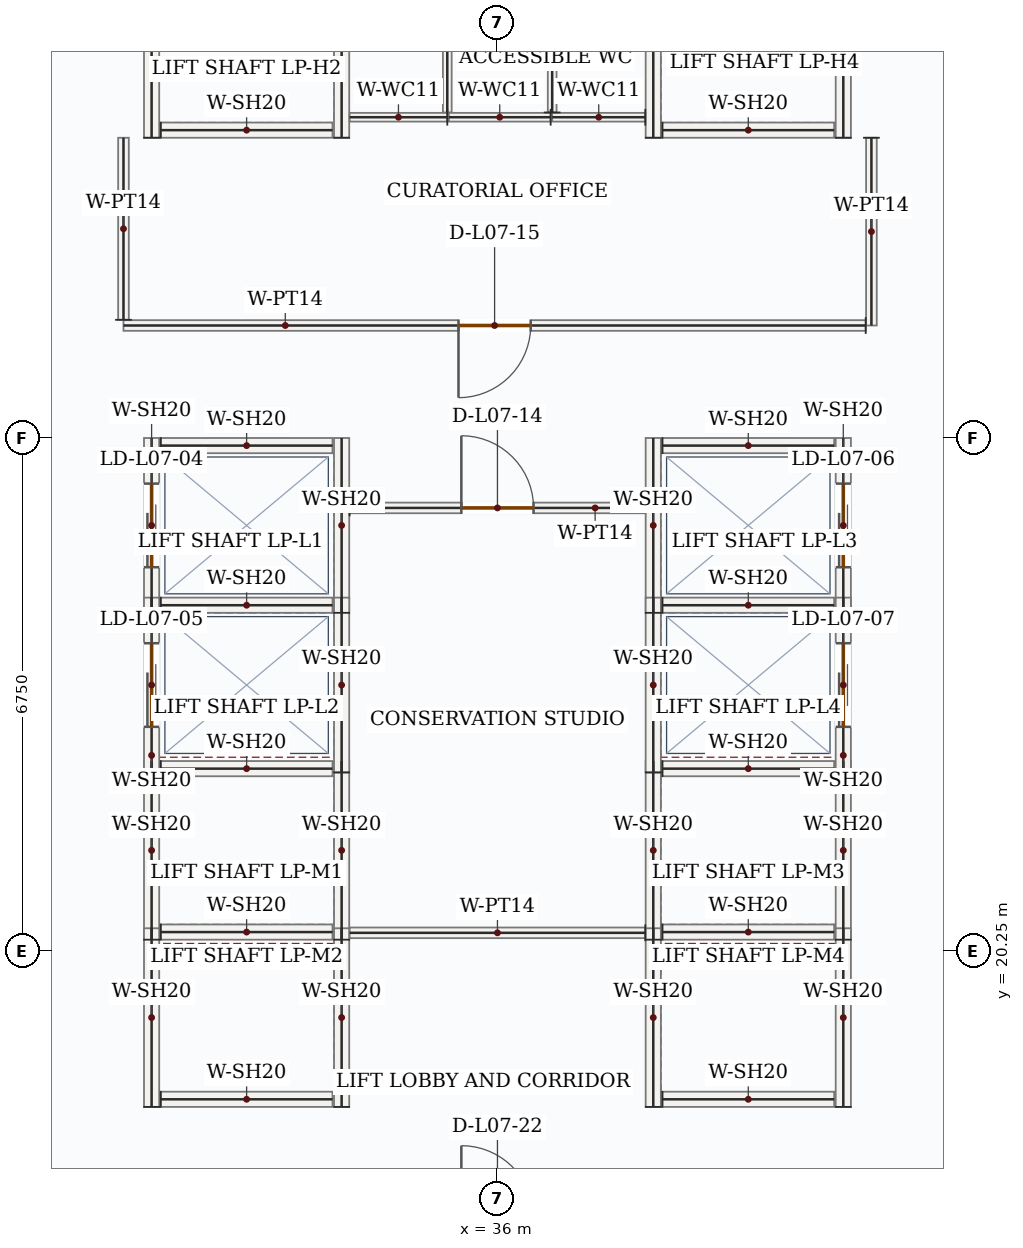
"""IFC4 building model, lengths in metres.
Left out: names, types, materials, properties, quantities, classifications, styles, units other than length and angle.
Written with IfcOpenShell. Run it as: python <this file> out.ifc"""

import sys

from ifc_helpers import new_model, si_unit, direction, frame, frame_2d, origin, place, context, subcontext, project, spatial, rectangle, extrude, source, transform, mapped, element, fill, save


model = new_model("IFC4")
c1 = context("Model", 3, precision=1e-05, world=origin(), true_north=direction((0.0, 1.0)))
c2 = subcontext(c1, "Body", "Model", "MODEL_VIEW")
j1 = project(units=[si_unit("LENGTHUNIT", "METRE"), si_unit("PLANEANGLEUNIT", "RADIAN")], contexts=[c1])
p1 = place(None, origin())
s1 = spatial("IfcSite", under=j1, at=p1, CompositionType="ELEMENT")
p2 = place(p1, origin())
s2 = spatial("IfcBuilding", under=s1, at=p2, CompositionType="ELEMENT")
p3 = place(p2, frame((0.0, 0.0, 37.5)))
s3 = spatial("IfcBuildingStorey", under=s2, at=p3, CompositionType="ELEMENT", Elevation=37.5)
m1 = source(origin(), c2, "Body", "SweptSolid", [
    extrude(rectangle(XDim=2.4, YDim=0.2, at=frame_2d((1.2, 0.0))), origin(), (0.0, 0.0, 1.0), 3.95),
])
for number, where, z_axis, x_axis in (
    (1, (31.45, 30.95, 0.0), (0.0, 0.0, 1.0), (0.0, 1.0, 0.0)),
    (2, (33.95, 30.95, 0.0), (0.0, 0.0, 1.0), (0.0, 1.0, 0.0)),
):
    element("IfcWall", number, at=place(p3, frame(where, z_axis=z_axis, x_axis=x_axis)), inside=s3, PredefinedType="SOLIDWALL", context=c2, shape_type="MappedRepresentation", body=[
        mapped(m1, transform((0.0, 0.0, 0.0), x_axis=(1.0, 0.0, 0.0), y_axis=(0.0, 1.0, 0.0), z_axis=(0.0, 0.0, 1.0), scale=1.0)),
    ])
m2 = source(origin(), c2, "Body", "SweptSolid", [
    extrude(rectangle(XDim=2.26, YDim=0.2, at=frame_2d((1.13, 0.0))), origin(), (0.0, 0.0, 1.0), 3.95),
])
p4 = place(p3, frame((31.57, 31.05, 0.0), z_axis=(0.0, 0.0, 1.0), x_axis=(1.0, 0.0, 0.0)))
e3 = element("IfcWall", 3, at=p4, inside=s3, PredefinedType="SOLIDWALL", context=c2, shape_type="MappedRepresentation", body=[
    mapped(m2, transform((0.0, 0.0, 0.0), x_axis=(1.0, 0.0, 0.0), y_axis=(0.0, 1.0, 0.0), z_axis=(0.0, 0.0, 1.0), scale=1.0)),
])
for number, where, z_axis, x_axis in (
    (4, (38.05, 30.95, 0.0), (0.0, 0.0, 1.0), (0.0, 1.0, 0.0)),
    (5, (40.55, 30.95, 0.0), (0.0, 0.0, 1.0), (0.0, 1.0, 0.0)),
):
    element("IfcWall", number, at=place(p3, frame(where, z_axis=z_axis, x_axis=x_axis)), inside=s3, PredefinedType="SOLIDWALL", context=c2, shape_type="MappedRepresentation", body=[
        mapped(m1, transform((0.0, 0.0, 0.0), x_axis=(1.0, 0.0, 0.0), y_axis=(0.0, 1.0, 0.0), z_axis=(0.0, 0.0, 1.0), scale=1.0)),
    ])
p5 = place(p3, frame((38.17, 31.05, 0.0), z_axis=(0.0, 0.0, 1.0), x_axis=(1.0, 0.0, 0.0)))
e6 = element("IfcWall", 6, at=p5, inside=s3, PredefinedType="SOLIDWALL", context=c2, shape_type="MappedRepresentation", body=[
    mapped(m2, transform((0.0, 0.0, 0.0), x_axis=(1.0, 0.0, 0.0), y_axis=(0.0, 1.0, 0.0), z_axis=(0.0, 0.0, 1.0), scale=1.0)),
])
m3 = source(origin(), c2, "Body", "SweptSolid", [
    extrude(rectangle(XDim=2.35, YDim=0.2, at=frame_2d((1.175, 0.0))), origin(), (0.0, 0.0, 1.0), 3.95),
])
for number, where, z_axis, x_axis in (
    (7, (31.45, 20.4, 0.0), (0.0, 0.0, 1.0), (0.0, 1.0, 0.0)),
    (8, (33.95, 20.4, 0.0), (0.0, 0.0, 1.0), (0.0, 1.0, 0.0)),
):
    element("IfcWall", number, at=place(p3, frame(where, z_axis=z_axis, x_axis=x_axis)), inside=s3, PredefinedType="SOLIDWALL", context=c2, shape_type="MappedRepresentation", body=[
        mapped(m3, transform((0.0, 0.0, 0.0), x_axis=(1.0, 0.0, 0.0), y_axis=(0.0, 1.0, 0.0), z_axis=(0.0, 0.0, 1.0), scale=1.0)),
    ])
for number, where, z_axis, x_axis in (
    (9, (31.57, 20.5, 0.0), (0.0, 0.0, 1.0), (1.0, 0.0, 0.0)),
    (10, (31.57, 22.65, 0.0), (0.0, 0.0, 1.0), (1.0, 0.0, 0.0)),
):
    element("IfcWall", number, at=place(p3, frame(where, z_axis=z_axis, x_axis=x_axis)), inside=s3, PredefinedType="SOLIDWALL", context=c2, shape_type="MappedRepresentation", body=[
        mapped(m2, transform((0.0, 0.0, 0.0), x_axis=(1.0, 0.0, 0.0), y_axis=(0.0, 1.0, 0.0), z_axis=(0.0, 0.0, 1.0), scale=1.0)),
    ])
for number, where, z_axis, x_axis in (
    (11, (31.45, 18.2, 0.0), (0.0, 0.0, 1.0), (0.0, 1.0, 0.0)),
    (12, (33.95, 18.2, 0.0), (0.0, 0.0, 1.0), (0.0, 1.0, 0.0)),
):
    element("IfcWall", number, at=place(p3, frame(where, z_axis=z_axis, x_axis=x_axis)), inside=s3, PredefinedType="SOLIDWALL", context=c2, shape_type="MappedRepresentation", body=[
        mapped(m3, transform((0.0, 0.0, 0.0), x_axis=(1.0, 0.0, 0.0), y_axis=(0.0, 1.0, 0.0), z_axis=(0.0, 0.0, 1.0), scale=1.0)),
    ])
p6 = place(p3, frame((31.57, 18.3, 0.0), z_axis=(0.0, 0.0, 1.0), x_axis=(1.0, 0.0, 0.0)))
e13 = element("IfcWall", 13, at=p6, inside=s3, PredefinedType="SOLIDWALL", context=c2, shape_type="MappedRepresentation", body=[
    mapped(m2, transform((0.0, 0.0, 0.0), x_axis=(1.0, 0.0, 0.0), y_axis=(0.0, 1.0, 0.0), z_axis=(0.0, 0.0, 1.0), scale=1.0)),
])
for number, where, z_axis, x_axis in (
    (14, (38.05, 20.4, 0.0), (0.0, 0.0, 1.0), (0.0, 1.0, 0.0)),
    (15, (40.55, 20.4, 0.0), (0.0, 0.0, 1.0), (0.0, 1.0, 0.0)),
):
    element("IfcWall", number, at=place(p3, frame(where, z_axis=z_axis, x_axis=x_axis)), inside=s3, PredefinedType="SOLIDWALL", context=c2, shape_type="MappedRepresentation", body=[
        mapped(m3, transform((0.0, 0.0, 0.0), x_axis=(1.0, 0.0, 0.0), y_axis=(0.0, 1.0, 0.0), z_axis=(0.0, 0.0, 1.0), scale=1.0)),
    ])
for number, where, z_axis, x_axis in (
    (16, (38.17, 20.5, 0.0), (0.0, 0.0, 1.0), (1.0, 0.0, 0.0)),
    (17, (38.17, 22.65, 0.0), (0.0, 0.0, 1.0), (1.0, 0.0, 0.0)),
):
    element("IfcWall", number, at=place(p3, frame(where, z_axis=z_axis, x_axis=x_axis)), inside=s3, PredefinedType="SOLIDWALL", context=c2, shape_type="MappedRepresentation", body=[
        mapped(m2, transform((0.0, 0.0, 0.0), x_axis=(1.0, 0.0, 0.0), y_axis=(0.0, 1.0, 0.0), z_axis=(0.0, 0.0, 1.0), scale=1.0)),
    ])
for number, where, z_axis, x_axis in (
    (18, (38.05, 18.2, 0.0), (0.0, 0.0, 1.0), (0.0, 1.0, 0.0)),
    (19, (40.55, 18.2, 0.0), (0.0, 0.0, 1.0), (0.0, 1.0, 0.0)),
):
    element("IfcWall", number, at=place(p3, frame(where, z_axis=z_axis, x_axis=x_axis)), inside=s3, PredefinedType="SOLIDWALL", context=c2, shape_type="MappedRepresentation", body=[
        mapped(m3, transform((0.0, 0.0, 0.0), x_axis=(1.0, 0.0, 0.0), y_axis=(0.0, 1.0, 0.0), z_axis=(0.0, 0.0, 1.0), scale=1.0)),
    ])
p7 = place(p3, frame((38.17, 18.3, 0.0), z_axis=(0.0, 0.0, 1.0), x_axis=(1.0, 0.0, 0.0)))
e20 = element("IfcWall", 20, at=p7, inside=s3, PredefinedType="SOLIDWALL", context=c2, shape_type="MappedRepresentation", body=[
    mapped(m2, transform((0.0, 0.0, 0.0), x_axis=(1.0, 0.0, 0.0), y_axis=(0.0, 1.0, 0.0), z_axis=(0.0, 0.0, 1.0), scale=1.0)),
])
p8 = place(p3, frame((31.45, 24.7, 0.0), z_axis=(0.0, 0.0, 1.0), x_axis=(0.0, 1.0, 0.0)))
e21 = element("IfcWall", 21, at=p8, inside=s3, PredefinedType="SOLIDWALL", context=c2, shape_type="SweptSolid", body=[
    extrude(rectangle(XDim=2.3, YDim=0.2, at=frame_2d((1.15, 0.0))), origin(), (0.0, 0.0, 1.0), 3.95),
])
p9 = place(p8, frame((0.6, 0.0, 0.0)))
e22 = element("IfcOpeningElement", 22, at=p9, cuts=e21, PredefinedType="OPENING", context=c2, shape_type="SweptSolid", body=[
    extrude(rectangle(XDim=1.1, YDim=2.15, at=frame_2d((0.55, 1.075))), frame((0.0, 0.11, 0.0), z_axis=(0.0, -1.0, 0.0), x_axis=(1.0, 0.0, 0.0)), (0.0, 0.0, 1.0), 0.22),
])
m4 = source(origin(), c2, "Body", "SweptSolid", [
    extrude(rectangle(XDim=2.3, YDim=0.2, at=frame_2d((1.15, 0.0))), origin(), (0.0, 0.0, 1.0), 3.95),
])
p10 = place(p3, frame((33.95, 24.7, 0.0), z_axis=(0.0, 0.0, 1.0), x_axis=(0.0, 1.0, 0.0)))
e23 = element("IfcWall", 23, at=p10, inside=s3, PredefinedType="SOLIDWALL", context=c2, shape_type="MappedRepresentation", body=[
    mapped(m4, transform((0.0, 0.0, 0.0), x_axis=(1.0, 0.0, 0.0), y_axis=(0.0, 1.0, 0.0), z_axis=(0.0, 0.0, 1.0), scale=1.0)),
])
for number, where, z_axis, x_axis in (
    (24, (31.57, 24.8, 0.0), (0.0, 0.0, 1.0), (1.0, 0.0, 0.0)),
    (25, (31.57, 26.9, 0.0), (0.0, 0.0, 1.0), (1.0, 0.0, 0.0)),
):
    element("IfcWall", number, at=place(p3, frame(where, z_axis=z_axis, x_axis=x_axis)), inside=s3, PredefinedType="SOLIDWALL", context=c2, shape_type="MappedRepresentation", body=[
        mapped(m2, transform((0.0, 0.0, 0.0), x_axis=(1.0, 0.0, 0.0), y_axis=(0.0, 1.0, 0.0), z_axis=(0.0, 0.0, 1.0), scale=1.0)),
    ])
p11 = place(p3, frame((31.45, 22.6, 0.0), z_axis=(0.0, 0.0, 1.0), x_axis=(0.0, 1.0, 0.0)))
e26 = element("IfcWall", 26, at=p11, inside=s3, PredefinedType="SOLIDWALL", context=c2, shape_type="SweptSolid", body=[
    extrude(rectangle(XDim=2.3, YDim=0.2, at=frame_2d((1.15, 0.0))), origin(), (0.0, 0.0, 1.0), 3.95),
])
p12 = place(p11, frame((0.6, 0.0, 0.0)))
e27 = element("IfcOpeningElement", 27, at=p12, cuts=e26, PredefinedType="OPENING", context=c2, shape_type="SweptSolid", body=[
    extrude(rectangle(XDim=1.1, YDim=2.15, at=frame_2d((0.55, 1.075))), frame((0.0, 0.11, 0.0), z_axis=(0.0, -1.0, 0.0), x_axis=(1.0, 0.0, 0.0)), (0.0, 0.0, 1.0), 0.22),
])
m5 = source(origin(), c2, "Body", "SweptSolid", [
    extrude(rectangle(XDim=2.3, YDim=0.2, at=frame_2d((1.15, 0.0))), origin(), (0.0, 0.0, 1.0), 3.95),
])
p13 = place(p3, frame((33.95, 22.6, 0.0), z_axis=(0.0, 0.0, 1.0), x_axis=(0.0, 1.0, 0.0)))
e28 = element("IfcWall", 28, at=p13, inside=s3, PredefinedType="SOLIDWALL", context=c2, shape_type="MappedRepresentation", body=[
    mapped(m5, transform((0.0, 0.0, 0.0), x_axis=(1.0, 0.0, 0.0), y_axis=(0.0, 1.0, 0.0), z_axis=(0.0, 0.0, 1.0), scale=1.0)),
])
p14 = place(p3, frame((38.05, 24.7, 0.0), z_axis=(0.0, 0.0, 1.0), x_axis=(0.0, 1.0, 0.0)))
e29 = element("IfcWall", 29, at=p14, inside=s3, PredefinedType="SOLIDWALL", context=c2, shape_type="MappedRepresentation", body=[
    mapped(m4, transform((0.0, 0.0, 0.0), x_axis=(1.0, 0.0, 0.0), y_axis=(0.0, 1.0, 0.0), z_axis=(0.0, 0.0, 1.0), scale=1.0)),
])
p15 = place(p3, frame((40.55, 24.7, 0.0), z_axis=(0.0, 0.0, 1.0), x_axis=(0.0, 1.0, 0.0)))
e30 = element("IfcWall", 30, at=p15, inside=s3, PredefinedType="SOLIDWALL", context=c2, shape_type="SweptSolid", body=[
    extrude(rectangle(XDim=2.3, YDim=0.2, at=frame_2d((1.15, 0.0))), origin(), (0.0, 0.0, 1.0), 3.95),
])
p16 = place(p15, frame((0.6, 0.0, 0.0)))
e31 = element("IfcOpeningElement", 31, at=p16, cuts=e30, PredefinedType="OPENING", context=c2, shape_type="SweptSolid", body=[
    extrude(rectangle(XDim=1.1, YDim=2.15, at=frame_2d((0.55, 1.075))), frame((0.0, 0.11, 0.0), z_axis=(0.0, -1.0, 0.0), x_axis=(1.0, 0.0, 0.0)), (0.0, 0.0, 1.0), 0.22),
])
for number, where, z_axis, x_axis in (
    (32, (38.17, 24.8, 0.0), (0.0, 0.0, 1.0), (1.0, 0.0, 0.0)),
    (33, (38.17, 26.9, 0.0), (0.0, 0.0, 1.0), (1.0, 0.0, 0.0)),
):
    element("IfcWall", number, at=place(p3, frame(where, z_axis=z_axis, x_axis=x_axis)), inside=s3, PredefinedType="SOLIDWALL", context=c2, shape_type="MappedRepresentation", body=[
        mapped(m2, transform((0.0, 0.0, 0.0), x_axis=(1.0, 0.0, 0.0), y_axis=(0.0, 1.0, 0.0), z_axis=(0.0, 0.0, 1.0), scale=1.0)),
    ])
p17 = place(p3, frame((38.05, 22.6, 0.0), z_axis=(0.0, 0.0, 1.0), x_axis=(0.0, 1.0, 0.0)))
e34 = element("IfcWall", 34, at=p17, inside=s3, PredefinedType="SOLIDWALL", context=c2, shape_type="MappedRepresentation", body=[
    mapped(m5, transform((0.0, 0.0, 0.0), x_axis=(1.0, 0.0, 0.0), y_axis=(0.0, 1.0, 0.0), z_axis=(0.0, 0.0, 1.0), scale=1.0)),
])
p18 = place(p3, frame((40.55, 22.6, 0.0), z_axis=(0.0, 0.0, 1.0), x_axis=(0.0, 1.0, 0.0)))
e35 = element("IfcWall", 35, at=p18, inside=s3, PredefinedType="SOLIDWALL", context=c2, shape_type="SweptSolid", body=[
    extrude(rectangle(XDim=2.3, YDim=0.2, at=frame_2d((1.15, 0.0))), origin(), (0.0, 0.0, 1.0), 3.95),
])
p19 = place(p18, frame((0.6, 0.0, 0.0)))
e36 = element("IfcOpeningElement", 36, at=p19, cuts=e35, PredefinedType="OPENING", context=c2, shape_type="SweptSolid", body=[
    extrude(rectangle(XDim=1.1, YDim=2.15, at=frame_2d((0.55, 1.075))), frame((0.0, 0.11, 0.0), z_axis=(0.0, -1.0, 0.0), x_axis=(1.0, 0.0, 0.0)), (0.0, 0.0, 1.0), 0.22),
])
m6 = source(origin(), c2, "Body", "SweptSolid", [
    extrude(rectangle(XDim=1.225, YDim=0.115, at=frame_2d((0.613, 0.0))), origin(), (0.0, 0.0, 1.0), 3.95),
])
p20 = place(p3, frame((37.945, 31.22, 0.0), z_axis=(0.0, 0.0, 1.0), x_axis=(-1.0, 0.0, 0.0)))
e37 = element("IfcWall", 37, at=p20, inside=s3, PredefinedType="PARTITIONING", context=c2, shape_type="MappedRepresentation", body=[
    mapped(m6, transform((0.0, 0.0, 0.0), x_axis=(1.0, 0.0, 0.0), y_axis=(0.0, 1.0, 0.0), z_axis=(0.0, 0.0, 1.0), scale=1.0)),
])
m7 = source(origin(), c2, "Body", "SweptSolid", [
    extrude(rectangle(XDim=3.998, YDim=0.115, at=frame_2d((1.999, 0.0))), origin(), (0.0, 0.0, 1.0), 3.95),
])
p21 = place(p3, frame((36.72, 31.282, 0.0), z_axis=(0.0, 0.0, 1.0), x_axis=(0.0, 1.0, 0.0)))
e38 = element("IfcWall", 38, at=p21, inside=s3, PredefinedType="PARTITIONING", context=c2, shape_type="MappedRepresentation", body=[
    mapped(m7, transform((0.0, 0.0, 0.0), x_axis=(1.0, 0.0, 0.0), y_axis=(0.0, 1.0, 0.0), z_axis=(0.0, 0.0, 1.0), scale=1.0)),
])
m8 = source(origin(), c2, "Body", "SweptSolid", [
    extrude(rectangle(XDim=1.285, YDim=0.115, at=frame_2d((0.643, 0.0))), origin(), (0.0, 0.0, 1.0), 3.95),
])
p22 = place(p3, frame((35.34, 31.22, 0.0), z_axis=(0.0, 0.0, 1.0), x_axis=(-1.0, 0.0, 0.0)))
e39 = element("IfcWall", 39, at=p22, inside=s3, PredefinedType="PARTITIONING", context=c2, shape_type="MappedRepresentation", body=[
    mapped(m8, transform((0.0, 0.0, 0.0), x_axis=(1.0, 0.0, 0.0), y_axis=(0.0, 1.0, 0.0), z_axis=(0.0, 0.0, 1.0), scale=1.0)),
])
m9 = source(origin(), c2, "Body", "SweptSolid", [
    extrude(rectangle(XDim=3.935, YDim=0.115, at=frame_2d((1.968, 0.0))), origin(), (0.0, 0.0, 1.0), 3.95),
])
p23 = place(p3, frame((35.34, 35.218, 0.0), z_axis=(0.0, 0.0, 1.0), x_axis=(0.0, -1.0, 0.0)))
e40 = element("IfcWall", 40, at=p23, inside=s3, PredefinedType="PARTITIONING", context=c2, shape_type="MappedRepresentation", body=[
    mapped(m9, transform((0.0, 0.0, 0.0), x_axis=(1.0, 0.0, 0.0), y_axis=(0.0, 1.0, 0.0), z_axis=(0.0, 0.0, 1.0), scale=1.0)),
])
m10 = source(origin(), c2, "Body", "SweptSolid", [
    extrude(rectangle(XDim=1.34, YDim=0.115, at=frame_2d((0.67, 0.0))), origin(), (0.0, 0.0, 1.0), 3.95),
])
p24 = place(p3, frame((36.7, 31.22, 0.0), z_axis=(0.0, 0.0, 1.0), x_axis=(-1.0, 0.0, 0.0)))
e41 = element("IfcWall", 41, at=p24, inside=s3, PredefinedType="PARTITIONING", context=c2, shape_type="MappedRepresentation", body=[
    mapped(m10, transform((0.0, 0.0, 0.0), x_axis=(1.0, 0.0, 0.0), y_axis=(0.0, 1.0, 0.0), z_axis=(0.0, 0.0, 1.0), scale=1.0)),
])
p25 = place(p3, frame((34.055, 26.08, 0.0), z_axis=(0.0, 0.0, 1.0), x_axis=(1.0, 0.0, 0.0)))
e42 = element("IfcWall", 42, at=p25, inside=s3, PredefinedType="PARTITIONING", context=c2, shape_type="SweptSolid", body=[
    extrude(rectangle(XDim=3.89, YDim=0.14, at=frame_2d((1.945, 0.0))), origin(), (0.0, 0.0, 1.0), 3.95),
])
p26 = place(p25, frame((1.47, 0.0, 0.0)))
e43 = element("IfcOpeningElement", 43, at=p26, cuts=e42, PredefinedType="OPENING", context=c2, shape_type="SweptSolid", body=[
    extrude(rectangle(XDim=0.95, YDim=2.15, at=frame_2d((0.475, 1.075))), frame((0.0, 0.08, 0.0), z_axis=(0.0, -1.0, 0.0), x_axis=(1.0, 0.0, 0.0)), (0.0, 0.0, 1.0), 0.16),
])
m11 = source(origin(), c2, "Body", "SweptSolid", [
    extrude(rectangle(XDim=3.89, YDim=0.14, at=frame_2d((1.945, 0.0))), origin(), (0.0, 0.0, 1.0), 3.95),
])
p27 = place(p3, frame((37.945, 20.49, 0.0), z_axis=(0.0, 0.0, 1.0), x_axis=(-1.0, 0.0, 0.0)))
e44 = element("IfcWall", 44, at=p27, inside=s3, PredefinedType="PARTITIONING", context=c2, shape_type="MappedRepresentation", body=[
    mapped(m11, transform((0.0, 0.0, 0.0), x_axis=(1.0, 0.0, 0.0), y_axis=(0.0, 1.0, 0.0), z_axis=(0.0, 0.0, 1.0), scale=1.0)),
])
m12 = source(origin(), c2, "Body", "SweptSolid", [
    extrude(rectangle(XDim=2.47, YDim=0.14, at=frame_2d((1.235, 0.0))), origin(), (0.0, 0.0, 1.0), 3.95),
])
p28 = place(p3, frame((40.92, 30.95, 0.0), z_axis=(0.0, 0.0, 1.0), x_axis=(0.0, -1.0, 0.0)))
e45 = element("IfcWall", 45, at=p28, inside=s3, PredefinedType="PARTITIONING", context=c2, shape_type="MappedRepresentation", body=[
    mapped(m12, transform((0.0, 0.0, 0.0), x_axis=(1.0, 0.0, 0.0), y_axis=(0.0, 1.0, 0.0), z_axis=(0.0, 0.0, 1.0), scale=1.0)),
])
p29 = place(p3, frame((40.845, 28.48, 0.0), z_axis=(0.0, 0.0, 1.0), x_axis=(-1.0, 0.0, 0.0)))
e46 = element("IfcWall", 46, at=p29, inside=s3, PredefinedType="PARTITIONING", context=c2, shape_type="SweptSolid", body=[
    extrude(rectangle(XDim=9.765, YDim=0.14, at=frame_2d((4.882, 0.0))), origin(), (0.0, 0.0, 1.0), 3.95),
])
p30 = place(p29, frame((4.407, 0.0, 0.0)))
e47 = element("IfcOpeningElement", 47, at=p30, cuts=e46, PredefinedType="OPENING", context=c2, shape_type="SweptSolid", body=[
    extrude(rectangle(XDim=0.95, YDim=2.15, at=frame_2d((0.475, 1.075))), frame((0.0, 0.08, 0.0), z_axis=(0.0, -1.0, 0.0), x_axis=(1.0, 0.0, 0.0)), (0.0, 0.0, 1.0), 0.16),
])
m13 = source(origin(), c2, "Body", "SweptSolid", [
    extrude(rectangle(XDim=2.395, YDim=0.14, at=frame_2d((1.198, 0.0))), origin(), (0.0, 0.0, 1.0), 3.95),
])
p31 = place(p3, frame((31.08, 28.555, 0.0), z_axis=(0.0, 0.0, 1.0), x_axis=(0.0, 1.0, 0.0)))
e48 = element("IfcWall", 48, at=p31, inside=s3, PredefinedType="PARTITIONING", context=c2, shape_type="MappedRepresentation", body=[
    mapped(m13, transform((0.0, 0.0, 0.0), x_axis=(1.0, 0.0, 0.0), y_axis=(0.0, 1.0, 0.0), z_axis=(0.0, 0.0, 1.0), scale=1.0)),
])
m14 = source(origin(), c2, "Body", "SweptSolid", [
    extrude(rectangle(XDim=1.1, YDim=2.15, at=frame_2d((0.55, 1.075))), frame((0.0, 0.025, 0.0), z_axis=(0.0, -1.0, 0.0), x_axis=(1.0, 0.0, 0.0)), (0.0, 0.0, 1.0), 0.05),
])
p32 = place(p9, origin())
e49 = element("IfcDoor", 49, at=p32, inside=s3, OperationType="DOUBLE_DOOR_SLIDING", PredefinedType="DOOR", context=c2, shape_type="MappedRepresentation", body=[
    mapped(m14, transform((0.0, 0.0, 0.0), x_axis=(1.0, 0.0, 0.0), y_axis=(0.0, 1.0, 0.0), z_axis=(0.0, 0.0, 1.0), scale=1.0)),
])
fill(e22, e49)
p33 = place(p12, origin())
e50 = element("IfcDoor", 50, at=p33, inside=s3, OperationType="DOUBLE_DOOR_SLIDING", PredefinedType="DOOR", context=c2, shape_type="MappedRepresentation", body=[
    mapped(m14, transform((0.0, 0.0, 0.0), x_axis=(1.0, 0.0, 0.0), y_axis=(0.0, 1.0, 0.0), z_axis=(0.0, 0.0, 1.0), scale=1.0)),
])
fill(e27, e50)
p34 = place(p16, origin())
e51 = element("IfcDoor", 51, at=p34, inside=s3, OperationType="DOUBLE_DOOR_SLIDING", PredefinedType="DOOR", context=c2, shape_type="MappedRepresentation", body=[
    mapped(m14, transform((0.0, 0.0, 0.0), x_axis=(1.0, 0.0, 0.0), y_axis=(0.0, 1.0, 0.0), z_axis=(0.0, 0.0, 1.0), scale=1.0)),
])
fill(e31, e51)
p35 = place(p19, origin())
e52 = element("IfcDoor", 52, at=p35, inside=s3, OperationType="DOUBLE_DOOR_SLIDING", PredefinedType="DOOR", context=c2, shape_type="MappedRepresentation", body=[
    mapped(m14, transform((0.0, 0.0, 0.0), x_axis=(1.0, 0.0, 0.0), y_axis=(0.0, 1.0, 0.0), z_axis=(0.0, 0.0, 1.0), scale=1.0)),
])
fill(e36, e52)
m15 = source(origin(), c2, "Body", "SweptSolid", [
    extrude(rectangle(XDim=0.95, YDim=2.15, at=frame_2d((0.475, 1.075))), frame((0.0, 0.025, 0.0), z_axis=(0.0, -1.0, 0.0), x_axis=(1.0, 0.0, 0.0)), (0.0, 0.0, 1.0), 0.05),
])
p36 = place(p26, origin())
e53 = element("IfcDoor", 53, at=p36, inside=s3, OperationType="SINGLE_SWING_LEFT", PredefinedType="DOOR", context=c2, shape_type="MappedRepresentation", body=[
    mapped(m15, transform((0.0, 0.0, 0.0), x_axis=(1.0, 0.0, 0.0), y_axis=(0.0, 1.0, 0.0), z_axis=(0.0, 0.0, 1.0), scale=1.0)),
])
fill(e43, e53)
p37 = place(p30, origin())
e54 = element("IfcDoor", 54, at=p37, inside=s3, OperationType="SINGLE_SWING_RIGHT", PredefinedType="DOOR", context=c2, shape_type="MappedRepresentation", body=[
    mapped(m15, transform((0.0, 0.0, 0.0), x_axis=(1.0, 0.0, 0.0), y_axis=(0.0, 1.0, 0.0), z_axis=(0.0, 0.0, 1.0), scale=1.0)),
])
fill(e47, e54)
save(model, sys.argv[1])
